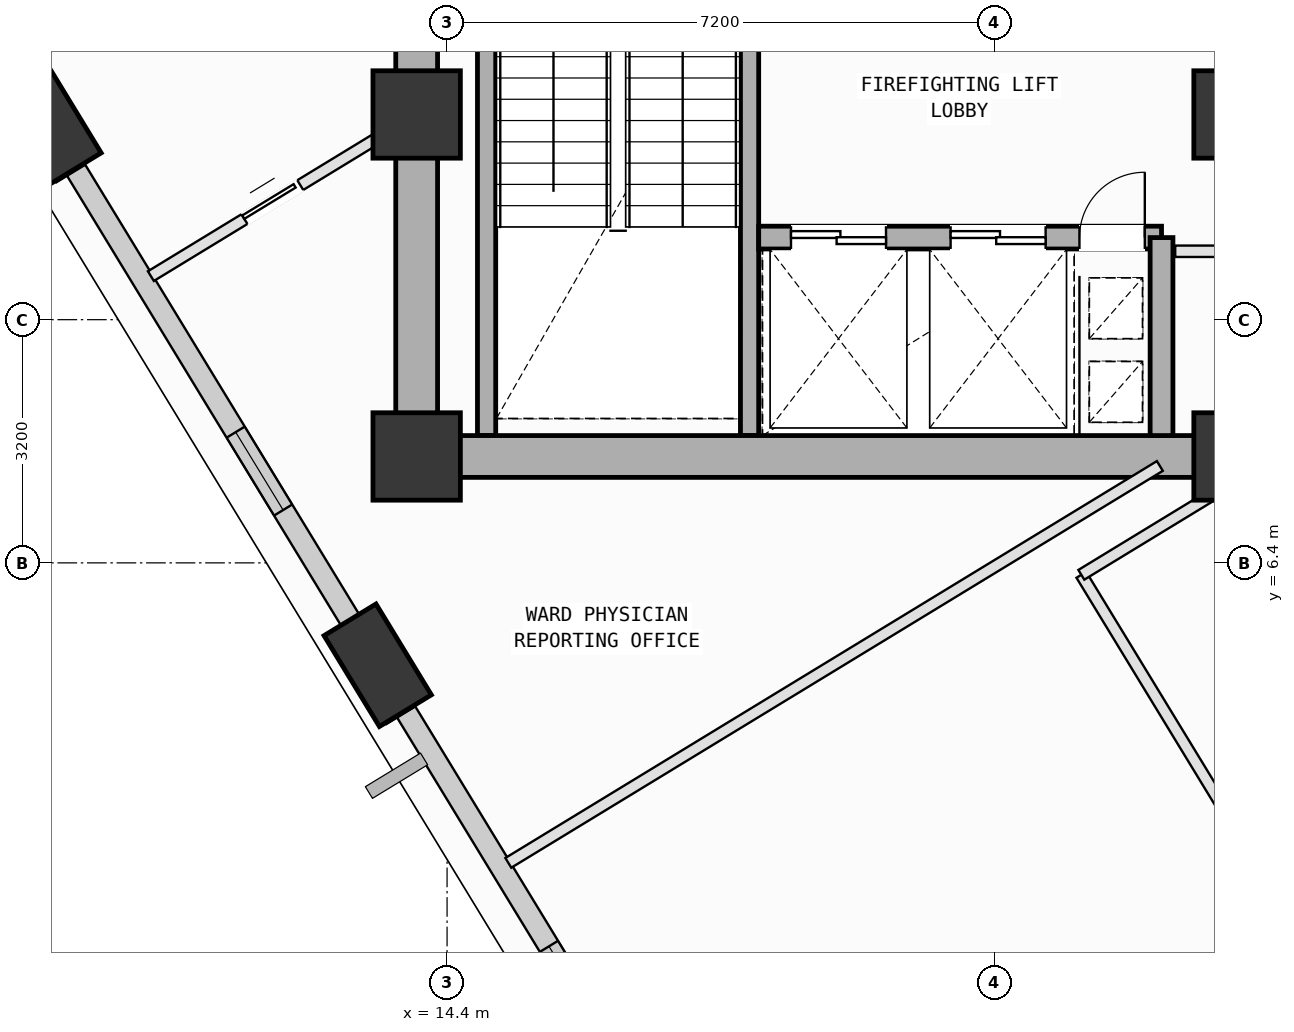
"""IFC4 building model, lengths in metres.
Left out: names, types, materials, properties, quantities, classifications, styles, units other than length and angle.
Written with IfcOpenShell. Run it as: python <this file> out.ifc"""

import sys

from ifc_helpers import new_model, si_unit, direction, frame, frame_2d, origin, origin_2d, place, context, subcontext, project, spatial, rectangle, extrude, element, fill, save


model = new_model("IFC4")
c1 = context("Model", 3, precision=1e-05, world=origin(), true_north=direction((0.0, 1.0)))
c2 = subcontext(c1, "Body", "Model", "MODEL_VIEW")
j1 = project(units=[si_unit("LENGTHUNIT", "METRE"), si_unit("PLANEANGLEUNIT", "RADIAN")], contexts=[c1])
p1 = place(None, origin())
s1 = spatial("IfcSite", under=j1, at=p1, CompositionType="ELEMENT")
p2 = place(p1, origin())
s2 = spatial("IfcBuilding", under=s1, at=p2, CompositionType="ELEMENT")
p3 = place(p2, frame((0.0, 0.0, 157.8)))
s3 = spatial("IfcBuildingStorey", under=s2, at=p3, CompositionType="ELEMENT", Elevation=157.8)
for number, where, z_axis, x_axis in (
    (1, (14.0, 7.8, 0.0), (0.0, 0.0, 1.0), (1.0, 0.0, 0.0)),
    (2, (14.0, 12.3, 0.0), (0.0, 0.0, 1.0), (1.0, 0.0, 0.0)),
    (3, (24.8, 7.8, 0.0), (0.0, 0.0, 1.0), (1.0, 0.0, 0.0)),
    (4, (24.8, 12.3, 0.0), (0.0, 0.0, 1.0), (1.0, 0.0, 0.0)),
):
    element("IfcColumn", number, at=place(p3, frame(where, z_axis=z_axis, x_axis=x_axis)), inside=s3, PredefinedType="COLUMN", context=c2, shape_type="SweptSolid", body=[
        extrude(rectangle(XDim=1.15, YDim=1.15, at=origin_2d()), origin(), (0.0, 0.0, 1.0), 4.0),
    ])
p4 = place(p3, frame((9.143, 12.184, 0.002), z_axis=(0.052806842128, -0.100272302524, 0.993557699769), x_axis=(-0.855705852019, 0.508331295313, 0.096782173078)))
e5 = element("IfcColumn", 5, at=p4, inside=s3, PredefinedType="COLUMN", context=c2, shape_type="SweptSolid", body=[
    extrude(rectangle(XDim=1.4, YDim=0.8, at=origin_2d()), origin(), (0.0, 0.0, 1.0), 4.022),
])
p5 = place(p3, frame((13.487, 5.053, 0.002), z_axis=(0.082036572403, -0.082157928279, 0.993237169869), x_axis=(-0.967499875139, 0.232621470961, 0.099152624038)))
e6 = element("IfcColumn", 6, at=p5, inside=s3, PredefinedType="COLUMN", context=c2, shape_type="SweptSolid", body=[
    extrude(rectangle(XDim=1.4, YDim=0.8, at=origin_2d()), origin(), (0.0, 0.0, 1.0), 4.023),
])
p6 = place(p3, frame((13.349, 5.28, 0.0), z_axis=(0.0, 0.0, 1.0), x_axis=(-0.520274172531, 0.853999288874, 0.0)))
e7 = element("IfcWall", 7, at=p6, inside=s3, PredefinedType="SOLIDWALL", context=c2, shape_type="SweptSolid", body=[
    extrude(rectangle(XDim=7.36, YDim=0.28, at=frame_2d((3.68, 0.0))), origin(), (0.0, 0.0, 1.0), 3.165),
])
p7 = place(p6, frame((2.125, 0.0, 0.75)))
e8 = element("IfcOpeningElement", 8, at=p7, cuts=e7, PredefinedType="OPENING", context=c2, shape_type="SweptSolid", body=[
    extrude(rectangle(XDim=1.2, YDim=1.75, at=frame_2d((0.6, 0.875))), frame((0.0, 0.15, 0.0), z_axis=(0.0, -1.0, 0.0), x_axis=(1.0, 0.0, 0.0)), (0.0, 0.0, 1.0), 0.3),
])
p8 = place(p3, frame((17.1, -0.877, 0.0), z_axis=(0.0, 0.0, 1.0), x_axis=(-0.520253060888, 0.854012150169, 0.0)))
e9 = element("IfcWall", 9, at=p8, inside=s3, PredefinedType="SOLIDWALL", context=c2, shape_type="SweptSolid", body=[
    extrude(rectangle(XDim=6.223, YDim=0.28, at=frame_2d((3.112, 0.0))), origin(), (0.0, 0.0, 1.0), 3.165),
])
p9 = place(p8, frame((1.013, 0.0, 0.75)))
e10 = element("IfcOpeningElement", 10, at=p9, cuts=e9, PredefinedType="OPENING", context=c2, shape_type="SweptSolid", body=[
    extrude(rectangle(XDim=1.6, YDim=1.95, at=frame_2d((0.8, 0.975))), frame((0.0, 0.15, 0.0), z_axis=(0.0, -1.0, 0.0), x_axis=(1.0, 0.0, 0.0)), (0.0, 0.0, 1.0), 0.3),
])
for number, where, z_axis, x_axis in (
    (11, (18.38, 15.12, 0.0), (0.0, 0.0, 1.0), (0.0, -1.0, 0.0)),
    (12, (14.92, 8.075, 0.0), (0.0, 0.0, 1.0), (0.0, 1.0, 0.0)),
):
    element("IfcWall", number, at=place(p3, frame(where, z_axis=z_axis, x_axis=x_axis)), inside=s3, PredefinedType="SOLIDWALL", context=c2, shape_type="SweptSolid", body=[
        extrude(rectangle(XDim=7.045, YDim=0.24, at=frame_2d((3.522, 0.0))), origin(), (0.0, 0.0, 1.0), 3.78),
    ])
p10 = place(p3, frame((14.0, 7.8, 0.0), z_axis=(0.0, 0.0, 1.0), x_axis=(1.0, 0.0, 0.0)))
e13 = element("IfcWall", 13, at=p10, inside=s3, PredefinedType="SHEAR", context=c2, shape_type="SweptSolid", body=[
    extrude(rectangle(XDim=10.8, YDim=0.55, at=frame_2d((5.4, 0.0))), origin(), (0.0, 0.0, 1.0), 3.78),
])
p11 = place(p3, frame((14.0, 16.8, 0.0), z_axis=(0.0, 0.0, 1.0), x_axis=(0.0, -1.0, 0.0)))
e14 = element("IfcWall", 14, at=p11, inside=s3, PredefinedType="SHEAR", context=c2, shape_type="SweptSolid", body=[
    extrude(rectangle(XDim=9.0, YDim=0.55, at=frame_2d((4.5, 0.0))), origin(), (0.0, 0.0, 1.0), 3.78),
])
p12 = place(p3, frame((18.5, 10.68, 0.0), z_axis=(0.0, 0.0, 1.0), x_axis=(1.0, 0.0, 0.0)))
e15 = element("IfcWall", 15, at=p12, inside=s3, PredefinedType="SOLIDWALL", context=c2, shape_type="SweptSolid", body=[
    extrude(rectangle(XDim=5.3, YDim=0.3, at=frame_2d((2.65, 0.0))), origin(), (0.0, 0.0, 1.0), 3.78),
])
p13 = place(p12, frame((4.22, 0.0, 0.0)))
e16 = element("IfcOpeningElement", 16, at=p13, cuts=e15, PredefinedType="OPENING", context=c2, shape_type="SweptSolid", body=[
    extrude(rectangle(XDim=0.86, YDim=2.06, at=frame_2d((0.43, 1.03))), frame((0.0, 0.16, 0.0), z_axis=(0.0, -1.0, 0.0), x_axis=(1.0, 0.0, 0.0)), (0.0, 0.0, 1.0), 0.32),
])
p14 = place(p12, frame((0.425, 0.0, 0.0)))
e17 = element("IfcOpeningElement", 17, at=p14, cuts=e15, PredefinedType="OPENING", context=c2, shape_type="SweptSolid", body=[
    extrude(rectangle(XDim=1.25, YDim=2.18, at=frame_2d((0.625, 1.09))), frame((0.0, 0.16, 0.0), z_axis=(0.0, -1.0, 0.0), x_axis=(1.0, 0.0, 0.0)), (0.0, 0.0, 1.0), 0.32),
])
p15 = place(p12, frame((2.525, 0.0, 0.0)))
e18 = element("IfcOpeningElement", 18, at=p15, cuts=e15, PredefinedType="OPENING", context=c2, shape_type="SweptSolid", body=[
    extrude(rectangle(XDim=1.25, YDim=2.18, at=frame_2d((0.625, 1.09))), frame((0.0, 0.16, 0.0), z_axis=(0.0, -1.0, 0.0), x_axis=(1.0, 0.0, 0.0)), (0.0, 0.0, 1.0), 0.32),
])
p16 = place(p3, frame((23.8, 8.075, 0.0), z_axis=(0.0, 0.0, 1.0), x_axis=(0.0, 1.0, 0.0)))
e19 = element("IfcWall", 19, at=p16, inside=s3, PredefinedType="SOLIDWALL", context=c2, shape_type="SweptSolid", body=[
    extrude(rectangle(XDim=2.605, YDim=0.3, at=frame_2d((1.302, 0.0))), origin(), (0.0, 0.0, 1.0), 3.78),
])
p17 = place(p3, frame((23.98, 10.5, 0.0), z_axis=(0.0, 0.0, 1.0), x_axis=(1.0, 0.0, 0.0)))
e20 = element("IfcWall", 20, at=p17, inside=s3, PredefinedType="PARTITIONING", context=c2, shape_type="SweptSolid", body=[
    extrude(rectangle(XDim=5.4, YDim=0.15, at=frame_2d((2.7, 0.0))), origin(), (0.0, 0.0, 1.0), 3.78),
])
p18 = place(p17, frame((3.703, 0.0, 0.0)))
e21 = element("IfcOpeningElement", 21, at=p18, cuts=e20, PredefinedType="OPENING", context=c2, shape_type="SweptSolid", body=[
    extrude(rectangle(XDim=0.86, YDim=2.06, at=frame_2d((0.43, 1.03))), frame((0.0, 0.085, 0.0), z_axis=(0.0, -1.0, 0.0), x_axis=(1.0, 0.0, 0.0)), (0.0, 0.0, 1.0), 0.17),
])
p19 = place(p3, frame((28.954, -3.949, 0.0), z_axis=(0.0, 0.0, 1.0), x_axis=(-0.520266211394, 0.854004138914, 0.0)))
e22 = element("IfcWall", 22, at=p19, inside=s3, PredefinedType="PARTITIONING", context=c2, shape_type="SweptSolid", body=[
    extrude(rectangle(XDim=11.934, YDim=0.15, at=frame_2d((5.967, 0.0))), origin(), (0.0, 0.0, 1.0), 3.78),
])
p20 = place(p3, frame((22.745, 6.243, 0.0), z_axis=(0.0, 0.0, 1.0), x_axis=(0.853950619488, 0.520354052041, 0.0)))
e23 = element("IfcWall", 23, at=p20, inside=s3, PredefinedType="PARTITIONING", context=c2, shape_type="SweptSolid", body=[
    extrude(rectangle(XDim=2.416, YDim=0.15, at=frame_2d((1.208, 0.0))), origin(), (0.0, 0.0, 1.0), 3.78),
])
p21 = place(p3, frame((23.778, 7.675, 0.0), z_axis=(0.0, 0.0, 1.0), x_axis=(-0.854003106526, -0.520267906029, 0.0)))
e24 = element("IfcWall", 24, at=p21, inside=s3, PredefinedType="PARTITIONING", context=c2, shape_type="SweptSolid", body=[
    extrude(rectangle(XDim=10.037, YDim=0.15, at=frame_2d((5.019, 0.0))), origin(), (0.0, 0.0, 1.0), 3.78),
])
p22 = place(p3, frame((13.665, 4.318, 0.0), z_axis=(0.0, 0.0, 1.0), x_axis=(-0.520347597219, 0.853954552695, 0.0)))
e25 = element("IfcWall", 25, at=p22, inside=s3, PredefinedType="PARTITIONING", context=c2, shape_type="SweptSolid", body=[
    extrude(rectangle(XDim=0.986, YDim=0.15, at=frame_2d((0.493, 0.0))), origin(), (0.0, 0.0, 1.0), 3.165),
])
p23 = place(p3, frame((10.503, 10.173, 0.0), z_axis=(0.0, 0.0, 1.0), x_axis=(0.853962981961, 0.520333763502, 0.0)))
e26 = element("IfcWall", 26, at=p23, inside=s3, PredefinedType="PARTITIONING", context=c2, shape_type="SweptSolid", body=[
    extrude(rectangle(XDim=3.744, YDim=0.15, at=frame_2d((1.872, 0.0))), origin(), (0.0, 0.0, 1.0), 3.78),
])
p24 = place(p23, frame((1.442, 0.0, 0.0)))
e27 = element("IfcOpeningElement", 27, at=p24, cuts=e26, PredefinedType="OPENING", context=c2, shape_type="SweptSolid", body=[
    extrude(rectangle(XDim=0.86, YDim=2.06, at=frame_2d((0.43, 1.03))), frame((0.0, 0.085, 0.0), z_axis=(0.0, -1.0, 0.0), x_axis=(1.0, 0.0, 0.0)), (0.0, 0.0, 1.0), 0.17),
])
p25 = place(p3, frame((9.323, 11.446, 0.0), z_axis=(0.0, 0.0, 1.0), x_axis=(-0.519946946896, 0.854198555614, 0.0)))
e28 = element("IfcWall", 28, at=p25, inside=s3, PredefinedType="PARTITIONING", context=c2, shape_type="SweptSolid", body=[
    extrude(rectangle(XDim=0.993, YDim=0.15, at=frame_2d((0.496, 0.0))), origin(), (0.0, 0.0, 1.0), 3.165),
])
p26 = place(p7, origin())
e29 = element("IfcWindow", 29, at=p26, inside=s3, PartitioningType="SINGLE_PANEL", PredefinedType="WINDOW", context=c2, shape_type="SweptSolid", body=[
    extrude(rectangle(XDim=1.2, YDim=1.75, at=frame_2d((0.6, 0.875))), frame((0.0, 0.03, 0.0), z_axis=(0.0, -1.0, 0.0), x_axis=(1.0, 0.0, 0.0)), (0.0, 0.0, 1.0), 0.06),
])
fill(e8, e29)
p27 = place(p9, origin())
e30 = element("IfcWindow", 30, at=p27, inside=s3, PartitioningType="SINGLE_PANEL", PredefinedType="WINDOW", context=c2, shape_type="SweptSolid", body=[
    extrude(rectangle(XDim=1.6, YDim=1.95, at=frame_2d((0.8, 0.975))), frame((0.0, 0.03, 0.0), z_axis=(0.0, -1.0, 0.0), x_axis=(1.0, 0.0, 0.0)), (0.0, 0.0, 1.0), 0.06),
])
fill(e10, e30)
p28 = place(p13, origin())
e31 = element("IfcDoor", 31, at=p28, inside=s3, OperationType="SINGLE_SWING_RIGHT", PredefinedType="DOOR", context=c2, shape_type="SweptSolid", body=[
    extrude(rectangle(XDim=0.86, YDim=2.06, at=frame_2d((0.43, 1.03))), frame((0.0, 0.025, 0.0), z_axis=(0.0, -1.0, 0.0), x_axis=(1.0, 0.0, 0.0)), (0.0, 0.0, 1.0), 0.05),
])
fill(e16, e31)
p29 = place(p14, origin())
e32 = element("IfcDoor", 32, at=p29, inside=s3, OperationType="DOUBLE_DOOR_SLIDING", PredefinedType="DOOR", context=c2, shape_type="SweptSolid", body=[
    extrude(rectangle(XDim=1.25, YDim=2.18, at=frame_2d((0.625, 1.09))), frame((0.0, 0.025, 0.0), z_axis=(0.0, -1.0, 0.0), x_axis=(1.0, 0.0, 0.0)), (0.0, 0.0, 1.0), 0.05),
])
fill(e17, e32)
p30 = place(p15, origin())
e33 = element("IfcDoor", 33, at=p30, inside=s3, OperationType="DOUBLE_DOOR_SLIDING", PredefinedType="DOOR", context=c2, shape_type="SweptSolid", body=[
    extrude(rectangle(XDim=1.25, YDim=2.18, at=frame_2d((0.625, 1.09))), frame((0.0, 0.025, 0.0), z_axis=(0.0, -1.0, 0.0), x_axis=(1.0, 0.0, 0.0)), (0.0, 0.0, 1.0), 0.05),
])
fill(e18, e33)
p31 = place(p24, origin())
e34 = element("IfcDoor", 34, at=p31, inside=s3, OperationType="SLIDING_TO_LEFT", PredefinedType="DOOR", context=c2, shape_type="SweptSolid", body=[
    extrude(rectangle(XDim=0.86, YDim=2.06, at=frame_2d((0.43, 1.03))), frame((0.0, 0.025, 0.0), z_axis=(0.0, -1.0, 0.0), x_axis=(1.0, 0.0, 0.0)), (0.0, 0.0, 1.0), 0.05),
])
fill(e27, e34)
save(model, sys.argv[1])
